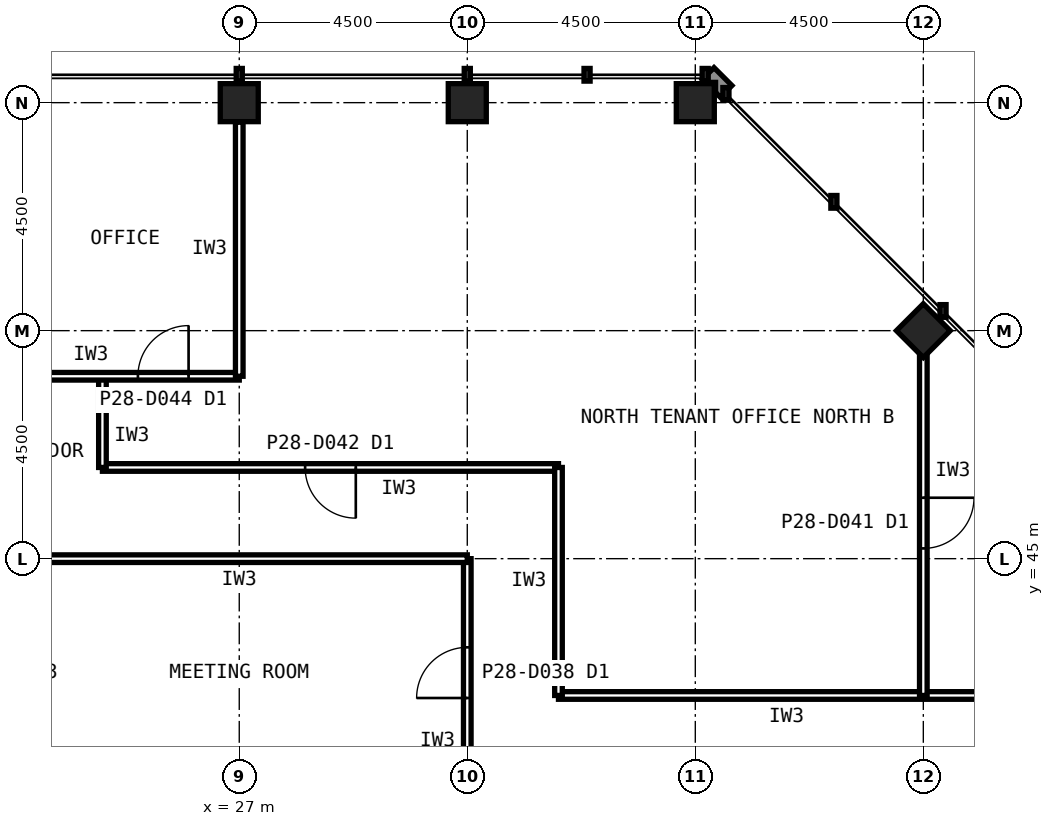
"""IFC4 building model, lengths in metres.
Left out: names, types, materials, properties, quantities, classifications, styles, units other than length and angle.
Written with IfcOpenShell. Run it as: python <this file> out.ifc"""

import sys

from ifc_helpers import new_model, si_unit, direction, frame, frame_2d, origin, origin_2d, place, context, subcontext, project, spatial, rectangle, hollow_rectangle, extrude, element, fill, save


model = new_model("IFC4")
c1 = context("Model", 3, precision=1e-05, world=origin(), true_north=direction((0.0, 1.0)))
c2 = subcontext(c1, "Body", "Model", "MODEL_VIEW")
j1 = project(units=[si_unit("LENGTHUNIT", "METRE"), si_unit("PLANEANGLEUNIT", "RADIAN")], contexts=[c1])
p1 = place(None, origin())
s1 = spatial("IfcSite", under=j1, at=p1, CompositionType="ELEMENT")
p2 = place(p1, origin())
s2 = spatial("IfcBuilding", under=s1, at=p2, CompositionType="ELEMENT")
p3 = place(p2, frame((0.0, 0.0, 119.6)))
s3 = spatial("IfcBuildingStorey", under=s2, at=p3, CompositionType="ELEMENT", Elevation=119.6)
for number, where, z_axis, x_axis in (
    (1, (36.0, 54.0, 0.0), (0.0, 0.0, 1.0), (1.0, 0.0, 0.0)),
    (2, (31.5, 54.0, 0.0), (0.0, 0.0, 1.0), (1.0, 0.0, 0.0)),
    (3, (27.0, 54.0, 0.0), (0.0, 0.0, 1.0), (1.0, 0.0, 0.0)),
    (4, (40.5, 49.5, 0.0), (0.0, 0.0, 1.0), (0.707, 0.707, 0.0)),
):
    element("IfcColumn", number, at=place(p3, frame(where, z_axis=z_axis, x_axis=x_axis)), inside=s3, PredefinedType="COLUMN", context=c2, shape_type="SweptSolid", body=[
        extrude(hollow_rectangle(XDim=0.75, YDim=0.75, WallThickness=0.04, at=origin_2d()), origin(), (0.0, 0.0, 1.0), 4.0),
    ])
p4 = place(p3, frame((33.3, 46.8, 0.0), z_axis=(0.0, 0.0, 1.0), x_axis=(-1.0, 0.0, 0.0)))
e5 = element("IfcWall", 5, at=p4, inside=s3, PredefinedType="PARTITIONING", context=c2, shape_type="SweptSolid", body=[
    extrude(rectangle(XDim=9.0, YDim=0.15, at=frame_2d((4.5, 0.0))), origin(), (0.0, 0.0, 1.0), 3.84),
])
p5 = place(p4, frame((4.0, 0.0, 0.0)))
e6 = element("IfcOpeningElement", 6, at=p5, cuts=e5, PredefinedType="OPENING", context=c2, shape_type="SweptSolid", body=[
    extrude(rectangle(XDim=1.0, YDim=2.1, at=frame_2d((0.5, 1.05))), frame((0.0, 0.085, 0.0), z_axis=(0.0, -1.0, 0.0), x_axis=(1.0, 0.0, 0.0)), (0.0, 0.0, 1.0), 0.17),
])
p6 = place(p3, frame((42.3, 42.3, 0.0), z_axis=(0.0, 0.0, 1.0), x_axis=(-1.0, 0.0, 0.0)))
e7 = element("IfcWall", 7, at=p6, inside=s3, PredefinedType="PARTITIONING", context=c2, shape_type="SweptSolid", body=[
    extrude(rectangle(XDim=9.0, YDim=0.15, at=frame_2d((4.5, 0.0))), origin(), (0.0, 0.0, 1.0), 3.84),
])
p7 = place(p3, frame((33.3, 42.3, 0.0), z_axis=(0.0, 0.0, 1.0), x_axis=(0.0, 1.0, 0.0)))
e8 = element("IfcWall", 8, at=p7, inside=s3, PredefinedType="PARTITIONING", context=c2, shape_type="SweptSolid", body=[
    extrude(rectangle(XDim=4.5, YDim=0.15, at=frame_2d((2.25, 0.0))), origin(), (0.0, 0.0, 1.0), 3.84),
])
p8 = place(p3, frame((24.3, 46.8, 0.0), z_axis=(0.0, 0.0, 1.0), x_axis=(0.0, 1.0, 0.0)))
e9 = element("IfcWall", 9, at=p8, inside=s3, PredefinedType="PARTITIONING", context=c2, shape_type="SweptSolid", body=[
    extrude(rectangle(XDim=1.8, YDim=0.15, at=frame_2d((0.9, 0.0))), origin(), (0.0, 0.0, 1.0), 3.84),
])
p9 = place(p3, frame((31.5, 40.5, 0.0), z_axis=(0.0, 0.0, 1.0), x_axis=(0.0, 1.0, 0.0)))
e10 = element("IfcWall", 10, at=p9, inside=s3, PredefinedType="PARTITIONING", context=c2, shape_type="SweptSolid", body=[
    extrude(rectangle(XDim=4.5, YDim=0.15, at=frame_2d((2.25, 0.0))), origin(), (0.0, 0.0, 1.0), 2.989),
])
p10 = place(p9, frame((1.75, 0.0, 0.0)))
e11 = element("IfcOpeningElement", 11, at=p10, cuts=e10, PredefinedType="OPENING", context=c2, shape_type="SweptSolid", body=[
    extrude(rectangle(XDim=1.0, YDim=2.1, at=frame_2d((0.5, 1.05))), frame((0.0, 0.085, 0.0), z_axis=(0.0, -1.0, 0.0), x_axis=(1.0, 0.0, 0.0)), (0.0, 0.0, 1.0), 0.17),
])
p11 = place(p3, frame((31.5, 45.0, 0.0), z_axis=(0.0, 0.0, 1.0), x_axis=(-1.0, 0.0, 0.0)))
e12 = element("IfcWall", 12, at=p11, inside=s3, PredefinedType="PARTITIONING", context=c2, shape_type="SweptSolid", body=[
    extrude(rectangle(XDim=9.0, YDim=0.15, at=frame_2d((4.5, 0.0))), origin(), (0.0, 0.0, 1.0), 3.84),
])
p12 = place(p3, frame((22.5, 48.6, 0.0), z_axis=(0.0, 0.0, 1.0), x_axis=(1.0, 0.0, 0.0)))
e13 = element("IfcWall", 13, at=p12, inside=s3, PredefinedType="PARTITIONING", context=c2, shape_type="SweptSolid", body=[
    extrude(rectangle(XDim=4.5, YDim=0.15, at=frame_2d((2.25, 0.0))), origin(), (0.0, 0.0, 1.0), 3.84),
])
p13 = place(p12, frame((2.5, 0.0, 0.0)))
e14 = element("IfcOpeningElement", 14, at=p13, cuts=e13, PredefinedType="OPENING", context=c2, shape_type="SweptSolid", body=[
    extrude(rectangle(XDim=1.0, YDim=2.1, at=frame_2d((0.5, 1.05))), frame((0.0, 0.085, 0.0), z_axis=(0.0, -1.0, 0.0), x_axis=(1.0, 0.0, 0.0)), (0.0, 0.0, 1.0), 0.17),
])
p14 = place(p3, frame((27.0, 48.6, 0.0), z_axis=(0.0, 0.0, 1.0), x_axis=(0.0, 1.0, 0.0)))
e15 = element("IfcWall", 15, at=p14, inside=s3, PredefinedType="PARTITIONING", context=c2, shape_type="SweptSolid", body=[
    extrude(rectangle(XDim=5.015, YDim=0.15, at=frame_2d((2.507, 0.0))), origin(), (0.0, 0.0, 1.0), 2.989),
])
p15 = place(p3, frame((40.5, 49.105, 0.0), z_axis=(0.0, 0.0, 1.0), x_axis=(0.0, -1.0, 0.0)))
e16 = element("IfcWall", 16, at=p15, inside=s3, PredefinedType="PARTITIONING", context=c2, shape_type="SweptSolid", body=[
    extrude(rectangle(XDim=6.805, YDim=0.15, at=frame_2d((3.402, 0.0))), origin(), (0.0, 0.0, 1.0), 2.989),
])
p16 = place(p15, frame((2.903, 0.0, 0.0)))
e17 = element("IfcOpeningElement", 17, at=p16, cuts=e16, PredefinedType="OPENING", context=c2, shape_type="SweptSolid", body=[
    extrude(rectangle(XDim=1.0, YDim=2.1, at=frame_2d((0.5, 1.05))), frame((0.0, 0.085, 0.0), z_axis=(0.0, -1.0, 0.0), x_axis=(1.0, 0.0, 0.0)), (0.0, 0.0, 1.0), 0.17),
])
p17 = place(p5, origin())
e18 = element("IfcDoor", 18, at=p17, inside=s3, OperationType="SINGLE_SWING_LEFT", PredefinedType="DOOR", context=c2, shape_type="SweptSolid", body=[
    extrude(rectangle(XDim=1.0, YDim=2.1, at=frame_2d((0.5, 1.05))), frame((0.0, 0.025, 0.0), z_axis=(0.0, -1.0, 0.0), x_axis=(1.0, 0.0, 0.0)), (0.0, 0.0, 1.0), 0.05),
])
fill(e6, e18)
p18 = place(p10, origin())
e19 = element("IfcDoor", 19, at=p18, inside=s3, OperationType="SINGLE_SWING_LEFT", PredefinedType="DOOR", context=c2, shape_type="SweptSolid", body=[
    extrude(rectangle(XDim=1.0, YDim=2.1, at=frame_2d((0.5, 1.05))), frame((0.0, 0.025, 0.0), z_axis=(0.0, -1.0, 0.0), x_axis=(1.0, 0.0, 0.0)), (0.0, 0.0, 1.0), 0.05),
])
fill(e11, e19)
p19 = place(p13, origin())
e20 = element("IfcDoor", 20, at=p19, inside=s3, OperationType="SINGLE_SWING_RIGHT", PredefinedType="DOOR", context=c2, shape_type="SweptSolid", body=[
    extrude(rectangle(XDim=1.0, YDim=2.1, at=frame_2d((0.5, 1.05))), frame((0.0, 0.025, 0.0), z_axis=(0.0, -1.0, 0.0), x_axis=(1.0, 0.0, 0.0)), (0.0, 0.0, 1.0), 0.05),
])
fill(e14, e20)
p20 = place(p16, origin())
e21 = element("IfcDoor", 21, at=p20, inside=s3, OperationType="SINGLE_SWING_LEFT", PredefinedType="DOOR", context=c2, shape_type="SweptSolid", body=[
    extrude(rectangle(XDim=1.0, YDim=2.1, at=frame_2d((0.5, 1.05))), frame((0.0, 0.025, 0.0), z_axis=(0.0, -1.0, 0.0), x_axis=(1.0, 0.0, 0.0)), (0.0, 0.0, 1.0), 0.05),
])
fill(e17, e21)
save(model, sys.argv[1])
